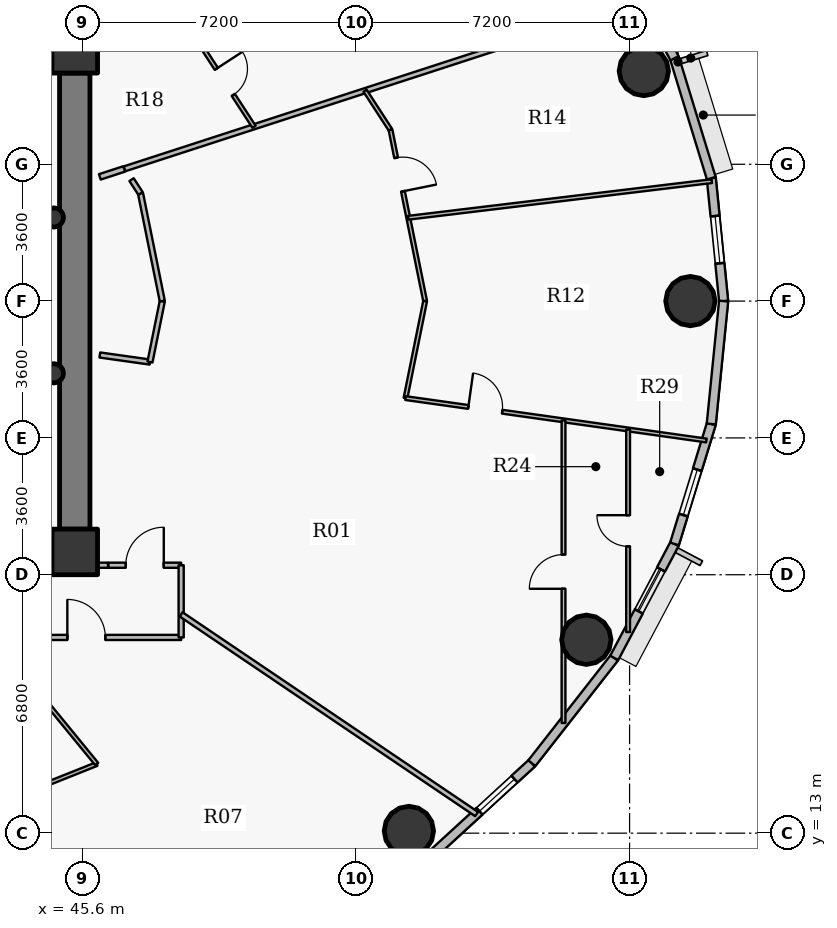
"""IFC4 building model, lengths in metres.
Left out: names, types, materials, properties, quantities, classifications, styles, units other than length and angle.
Written with IfcOpenShell. Run it as: python <this file> out.ifc"""

import sys

from ifc_helpers import new_model, si_unit, direction, frame, frame_2d, origin, origin_2d, place, context, subcontext, project, spatial, rectangle, hollow_circle, extrude, source, transform, mapped, element, fill, save


model = new_model("IFC4")
c1 = context("Model", 3, precision=1e-05, world=origin(), true_north=direction((0.0, 1.0)))
c2 = subcontext(c1, "Body", "Model", "MODEL_VIEW")
j1 = project(units=[si_unit("LENGTHUNIT", "METRE"), si_unit("PLANEANGLEUNIT", "RADIAN")], contexts=[c1])
p1 = place(None, origin())
s1 = spatial("IfcSite", under=j1, at=p1, CompositionType="ELEMENT")
p2 = place(p1, origin())
s2 = spatial("IfcBuilding", under=s1, at=p2, CompositionType="ELEMENT")
p3 = place(p2, frame((0.0, 0.0, 163.65)))
s3 = spatial("IfcBuildingStorey", under=s2, at=p3, CompositionType="ELEMENT", Elevation=163.65)
for number, where, z_axis, x_axis in (
    (1, (45.4, 20.4, 0.0), (0.0, 0.0, 1.0), (1.0, 0.0, 0.0)),
    (2, (45.4, 33.6, 0.0), (0.0, 0.0, 1.0), (1.0, 0.0, 0.0)),
):
    element("IfcColumn", number, at=place(p3, frame(where, z_axis=z_axis, x_axis=x_axis)), inside=s3, PredefinedType="COLUMN", context=c2, shape_type="SweptSolid", body=[
        extrude(rectangle(XDim=1.2, YDim=1.2, at=origin_2d()), origin(), (0.0, 0.0, 1.0), 3.75),
    ])
p4 = place(p3, frame((45.4, 33.0, 0.0), z_axis=(0.0, 0.0, 1.0), x_axis=(0.0, -1.0, 0.0)))
e3 = element("IfcWall", 3, at=p4, inside=s3, PredefinedType="SHEAR", context=c2, shape_type="SweptSolid", body=[
    extrude(rectangle(XDim=12.0, YDim=0.8, at=frame_2d((6.0, 0.0))), origin(), (0.0, 0.0, 1.0), 2.95),
])
for number, where, z_axis, x_axis in (
    (4, (61.6, 27.0, 0.0), (0.0, 0.0, 1.0), (1.0, 0.0, 0.0)),
    (5, (60.375, 33.053, 0.0), (0.0, 0.0, 1.0), (1.0, 0.0, 0.0)),
    (6, (54.192, 13.058, 0.0), (0.0, 0.0, 1.0), (1.0, 0.0, 0.0)),
    (7, (58.863, 18.089, 0.0), (0.0, 0.0, 1.0), (1.0, 0.0, 0.0)),
):
    element("IfcColumn", number, at=place(p3, frame(where, z_axis=z_axis, x_axis=x_axis)), inside=s3, PredefinedType="COLUMN", context=c2, shape_type="SweptSolid", body=[
        extrude(hollow_circle(Radius=0.65, WallThickness=0.04, at=origin_2d()), origin(), (0.0, 0.0, 1.0), 3.75),
    ])
for number, where, z_axis, x_axis in (
    (8, (44.85, 25.1, 0.0), (0.0, 0.0, 1.0), (1.0, 0.0, 0.0)),
    (9, (44.85, 29.2, 0.0), (0.0, 0.0, 1.0), (1.0, 0.0, 0.0)),
):
    element("IfcColumn", number, at=place(p3, frame(where, z_axis=z_axis, x_axis=x_axis)), inside=s3, PredefinedType="COLUMN", context=c2, shape_type="SweptSolid", body=[
        extrude(hollow_circle(Radius=0.254, WallThickness=0.02, at=origin_2d()), origin(), (0.0, 0.0, 1.0), 3.75),
    ])
p5 = place(p3, frame((62.15, 30.234, 0.0), z_axis=(0.0, 0.0, 1.0), x_axis=(0.100061534614, -0.994981250723, 0.0)))
e10 = element("IfcWall", 10, at=p5, inside=s3, PredefinedType="SOLIDWALL", context=c2, shape_type="SweptSolid", body=[
    extrude(rectangle(XDim=3.25, YDim=0.24, at=frame_2d((1.625, 0.0))), origin(), (0.0, 0.0, 1.0), 3.5),
])
p6 = place(p5, frame((1.0, 0.0, 0.9)))
e11 = element("IfcOpeningElement", 11, at=p6, cuts=e10, PredefinedType="OPENING", context=c2, shape_type="SweptSolid", body=[
    extrude(rectangle(XDim=1.25, YDim=1.65, at=origin_2d()), frame((0.625, 0.13, 0.825), z_axis=(0.0, -1.0, 0.0), x_axis=(1.0, 0.0, 0.0)), (0.0, 0.0, 1.0), 0.26),
])
p7 = place(p3, frame((61.183, 33.389, 0.0), z_axis=(0.0, 0.0, 1.0), x_axis=(0.293097995113, -0.956082405058, 0.0)))
e12 = element("IfcWall", 12, at=p7, inside=s3, PredefinedType="SOLIDWALL", context=c2, shape_type="SweptSolid", body=[
    extrude(rectangle(XDim=3.3, YDim=0.24, at=frame_2d((1.65, 0.0))), origin(), (0.0, 0.0, 1.0), 3.5),
])
p8 = place(p3, frame((59.596, 36.388, 0.0), z_axis=(0.0, 0.0, 1.0), x_axis=(0.467586874938, -0.88394712194, 0.0)))
e13 = element("IfcWall", 13, at=p8, inside=s3, PredefinedType="SOLIDWALL", context=c2, shape_type="SweptSolid", body=[
    extrude(rectangle(XDim=3.393, YDim=0.24, at=frame_2d((1.697, 0.0))), origin(), (0.0, 0.0, 1.0), 3.5),
])
p9 = place(p3, frame((57.428, 14.842, 0.0), z_axis=(0.0, 0.0, 1.0), x_axis=(-0.737076565834, -0.675809245349, 0.0)))
e14 = element("IfcWall", 14, at=p9, inside=s3, PredefinedType="SOLIDWALL", context=c2, shape_type="SweptSolid", body=[
    extrude(rectangle(XDim=3.658, YDim=0.24, at=frame_2d((1.829, 0.0))), origin(), (0.0, 0.0, 1.0), 3.5),
])
p10 = place(p9, frame((0.621, 0.0, 0.9)))
e15 = element("IfcOpeningElement", 15, at=p10, cuts=e14, PredefinedType="OPENING", context=c2, shape_type="SweptSolid", body=[
    extrude(rectangle(XDim=1.25, YDim=1.65, at=origin_2d()), frame((0.625, 0.13, 0.825), z_axis=(0.0, -1.0, 0.0), x_axis=(1.0, 0.0, 0.0)), (0.0, 0.0, 1.0), 0.26),
])
p11 = place(p3, frame((59.596, 17.612, 0.0), z_axis=(0.0, 0.0, 1.0), x_axis=(-0.616287674549, -0.787521112224, 0.0)))
e16 = element("IfcWall", 16, at=p11, inside=s3, PredefinedType="SOLIDWALL", context=c2, shape_type="SweptSolid", body=[
    extrude(rectangle(XDim=3.517, YDim=0.24, at=frame_2d((1.759, 0.0))), origin(), (0.0, 0.0, 1.0), 3.5),
])
p12 = place(p3, frame((61.183, 20.611, 0.0), z_axis=(0.0, 0.0, 1.0), x_axis=(-0.467586874938, -0.88394712194, 0.0)))
e17 = element("IfcWall", 17, at=p12, inside=s3, PredefinedType="SOLIDWALL", context=c2, shape_type="SweptSolid", body=[
    extrude(rectangle(XDim=3.393, YDim=0.24, at=frame_2d((1.697, 0.0))), origin(), (0.0, 0.0, 1.0), 3.5),
])
p13 = place(p12, frame((0.759, 0.0, 0.9)))
e18 = element("IfcOpeningElement", 18, at=p13, cuts=e17, PredefinedType="OPENING", context=c2, shape_type="SweptSolid", body=[
    extrude(rectangle(XDim=1.25, YDim=1.65, at=origin_2d()), frame((0.625, 0.13, 0.825), z_axis=(0.0, -1.0, 0.0), x_axis=(1.0, 0.0, 0.0)), (0.0, 0.0, 1.0), 0.26),
])
p14 = place(p3, frame((62.15, 23.766, 0.0), z_axis=(0.0, 0.0, 1.0), x_axis=(-0.293097995113, -0.956082405058, 0.0)))
e19 = element("IfcWall", 19, at=p14, inside=s3, PredefinedType="SOLIDWALL", context=c2, shape_type="SweptSolid", body=[
    extrude(rectangle(XDim=3.3, YDim=0.24, at=frame_2d((1.65, 0.0))), origin(), (0.0, 0.0, 1.0), 3.5),
])
p15 = place(p14, frame((1.256, 0.0, 0.9)))
e20 = element("IfcOpeningElement", 20, at=p15, cuts=e19, PredefinedType="OPENING", context=c2, shape_type="SweptSolid", body=[
    extrude(rectangle(XDim=1.25, YDim=1.65, at=origin_2d()), frame((0.625, 0.13, 0.825), z_axis=(0.0, -1.0, 0.0), x_axis=(1.0, 0.0, 0.0)), (0.0, 0.0, 1.0), 0.26),
])
p16 = place(p3, frame((62.475, 27.0, 0.0), z_axis=(0.0, 0.0, 1.0), x_axis=(-0.100061534614, -0.994981250723, 0.0)))
e21 = element("IfcWall", 21, at=p16, inside=s3, PredefinedType="SOLIDWALL", context=c2, shape_type="SweptSolid", body=[
    extrude(rectangle(XDim=3.25, YDim=0.24, at=frame_2d((1.625, 0.0))), origin(), (0.0, 0.0, 1.0), 3.5),
])
p17 = place(p3, frame((35.486, 18.15, 0.0), z_axis=(0.0, 0.0, 1.0), x_axis=(1.0, 0.0, 0.0)))
e22 = element("IfcWall", 22, at=p17, inside=s3, PredefinedType="PARTITIONING", context=c2, shape_type="SweptSolid", body=[
    extrude(rectangle(XDim=12.714, YDim=0.135, at=frame_2d((6.357, 0.0))), origin(), (0.0, 0.0, 1.0), 2.935),
])
p18 = place(p17, frame((1.628, 0.0, 0.0)))
e23 = element("IfcOpeningElement", 23, at=p18, cuts=e22, PredefinedType="OPENING", context=c2, shape_type="SweptSolid", body=[
    extrude(rectangle(XDim=1.0, YDim=2.15, at=origin_2d()), frame((0.5, 0.078, 1.075), z_axis=(0.0, -1.0, 0.0), x_axis=(1.0, 0.0, 0.0)), (0.0, 0.0, 1.0), 0.155),
])
p19 = place(p17, frame((9.719, 0.0, 0.0)))
e24 = element("IfcOpeningElement", 24, at=p19, cuts=e22, PredefinedType="OPENING", context=c2, shape_type="SweptSolid", body=[
    extrude(rectangle(XDim=1.0, YDim=2.15, at=origin_2d()), frame((0.5, 0.078, 1.075), z_axis=(0.0, -1.0, 0.0), x_axis=(1.0, 0.0, 0.0)), (0.0, 0.0, 1.0), 0.155),
])
p20 = place(p3, frame((41.794, 13.149, 0.0), z_axis=(0.0, 0.0, 1.0), x_axis=(0.928797683311, 0.370587187415, 0.0)))
e25 = element("IfcWall", 25, at=p20, inside=s3, PredefinedType="PARTITIONING", context=c2, shape_type="SweptSolid", body=[
    extrude(rectangle(XDim=4.506, YDim=0.1, at=frame_2d((2.253, 0.0))), origin(), (0.0, 0.0, 1.0), 2.935),
])
p21 = place(p20, frame((1.803, 0.0, 0.0)))
e26 = element("IfcOpeningElement", 26, at=p21, cuts=e25, PredefinedType="OPENING", context=c2, shape_type="SweptSolid", body=[
    extrude(rectangle(XDim=0.9, YDim=2.1, at=origin_2d()), frame((0.45, 0.06, 1.05), z_axis=(0.0, -1.0, 0.0), x_axis=(1.0, 0.0, 0.0)), (0.0, 0.0, 1.0), 0.12),
])
p22 = place(p3, frame((43.25, 18.15, 0.0), z_axis=(0.0, 0.0, 1.0), x_axis=(0.633743940899, -0.773542899505, 0.0)))
e27 = element("IfcWall", 27, at=p22, inside=s3, PredefinedType="PARTITIONING", context=c2, shape_type="SweptSolid", body=[
    extrude(rectangle(XDim=4.307, YDim=0.1, at=frame_2d((2.153, 0.0))), origin(), (0.0, 0.0, 1.0), 3.5),
])
p23 = place(p22, frame((0.414, 0.0, 0.0)))
e28 = element("IfcOpeningElement", 28, at=p23, cuts=e27, PredefinedType="OPENING", context=c2, shape_type="SweptSolid", body=[
    extrude(rectangle(XDim=0.82, YDim=2.1, at=origin_2d()), frame((0.41, 0.06, 1.05), z_axis=(0.0, -1.0, 0.0), x_axis=(1.0, 0.0, 0.0)), (0.0, 0.0, 1.0), 0.12),
])
p24 = place(p3, frame((46.285, 20.05, 0.0), z_axis=(0.0, 0.0, 1.0), x_axis=(1.0, 0.0, 0.0)))
e29 = element("IfcWall", 29, at=p24, inside=s3, PredefinedType="PARTITIONING", context=c2, shape_type="SweptSolid", body=[
    extrude(rectangle(XDim=1.915, YDim=0.135, at=frame_2d((0.958, 0.0))), origin(), (0.0, 0.0, 1.0), 3.5),
])
p25 = place(p24, frame((0.458, 0.0, 0.0)))
e30 = element("IfcOpeningElement", 30, at=p25, cuts=e29, PredefinedType="OPENING", context=c2, shape_type="SweptSolid", body=[
    extrude(rectangle(XDim=1.0, YDim=2.15, at=origin_2d()), frame((0.5, 0.078, 1.075), z_axis=(0.0, -1.0, 0.0), x_axis=(1.0, 0.0, 0.0)), (0.0, 0.0, 1.0), 0.155),
])
p26 = place(p3, frame((46.71, 30.48, 0.0), z_axis=(0.0, 0.0, 1.0), x_axis=(0.951054665008, 0.309022691992, 0.0)))
e31 = element("IfcWall", 31, at=p26, inside=s3, PredefinedType="PARTITIONING", context=c2, shape_type="SweptSolid", body=[
    extrude(rectangle(XDim=14.372, YDim=0.135, at=frame_2d((7.186, 0.0))), origin(), (0.0, 0.0, 1.0), 2.935),
])
p27 = place(p3, frame((48.2, 18.15, 0.0), z_axis=(0.0, 0.0, 1.0), x_axis=(0.0, 1.0, 0.0)))
e32 = element("IfcWall", 32, at=p27, inside=s3, PredefinedType="PARTITIONING", context=c2, shape_type="SweptSolid", body=[
    extrude(rectangle(XDim=1.9, YDim=0.135, at=frame_2d((0.95, 0.0))), origin(), (0.0, 0.0, 1.0), 3.5),
])
p28 = place(p3, frame((48.2, 18.756, 0.0), z_axis=(0.0, 0.0, 1.0), x_axis=(0.828559609568, -0.559900860325, 0.0)))
e33 = element("IfcWall", 33, at=p28, inside=s3, PredefinedType="PARTITIONING", context=c2, shape_type="SweptSolid", body=[
    extrude(rectangle(XDim=9.384, YDim=0.135, at=frame_2d((4.692, 0.0))), origin(), (0.0, 0.0, 1.0), 2.935),
])
p29 = place(p3, frame((48.58, 33.95, 0.0), z_axis=(0.0, 0.0, 1.0), x_axis=(0.545393120499, -0.838180376836, 0.0)))
e34 = element("IfcWall", 34, at=p29, inside=s3, PredefinedType="PARTITIONING", context=c2, shape_type="SweptSolid", body=[
    extrude(rectangle(XDim=2.819, YDim=0.1, at=frame_2d((1.41, 0.0))), origin(), (0.0, 0.0, 1.0), 3.5),
])
p30 = place(p29, frame((1.0, 0.0, 0.0)))
e35 = element("IfcOpeningElement", 35, at=p30, cuts=e34, PredefinedType="OPENING", context=c2, shape_type="SweptSolid", body=[
    extrude(rectangle(XDim=0.82, YDim=2.1, at=origin_2d()), frame((0.41, 0.06, 1.05), z_axis=(0.0, -1.0, 0.0), x_axis=(1.0, 0.0, 0.0)), (0.0, 0.0, 1.0), 0.12),
])
p31 = place(p3, frame((53.038, 32.536, 0.0), z_axis=(0.0, 0.0, 1.0), x_axis=(0.545407162254, -0.83817123988, 0.0)))
e36 = element("IfcWall", 36, at=p31, inside=s3, PredefinedType="PARTITIONING", context=c2, shape_type="SweptSolid", body=[
    extrude(rectangle(XDim=1.229, YDim=0.1, at=frame_2d((0.615, 0.0))), origin(), (0.0, 0.0, 1.0), 2.935),
])
p32 = place(p3, frame((53.709, 31.506, 0.0), z_axis=(0.0, 0.0, 1.0), x_axis=(0.198209478932, -0.980159682124, 0.0)))
e37 = element("IfcWall", 37, at=p32, inside=s3, PredefinedType="PARTITIONING", context=c2, shape_type="SweptSolid", body=[
    extrude(rectangle(XDim=4.597, YDim=0.1, at=frame_2d((2.298, 0.0))), origin(), (0.0, 0.0, 1.0), 2.935),
])
p33 = place(p32, frame((0.75, 0.0, 0.0)))
e38 = element("IfcOpeningElement", 38, at=p33, cuts=e37, PredefinedType="OPENING", context=c2, shape_type="SweptSolid", body=[
    extrude(rectangle(XDim=0.9, YDim=2.1, at=origin_2d()), frame((0.45, 0.06, 1.05), z_axis=(0.0, -1.0, 0.0), x_axis=(1.0, 0.0, 0.0)), (0.0, 0.0, 1.0), 0.12),
])
p34 = place(p3, frame((54.104, 24.448, 0.0), z_axis=(0.0, 0.0, 1.0), x_axis=(0.198315541218, 0.980138228063, 0.0)))
e39 = element("IfcWall", 39, at=p34, inside=s3, PredefinedType="PARTITIONING", context=c2, shape_type="SweptSolid", body=[
    extrude(rectangle(XDim=2.604, YDim=0.1, at=frame_2d((1.302, 0.0))), origin(), (0.0, 0.0, 1.0), 2.935),
])
p35 = place(p3, frame((54.104, 24.448, 0.0), z_axis=(0.0, 0.0, 1.0), x_axis=(0.990209750791, -0.139587425789, 0.0)))
e40 = element("IfcWall", 40, at=p35, inside=s3, PredefinedType="PARTITIONING", context=c2, shape_type="SweptSolid", body=[
    extrude(rectangle(XDim=7.997, YDim=0.1, at=frame_2d((3.998, 0.0))), origin(), (0.0, 0.0, 1.0), 2.935),
])
p36 = place(p35, frame((1.67, 0.0, 0.0)))
e41 = element("IfcOpeningElement", 41, at=p36, cuts=e40, PredefinedType="OPENING", context=c2, shape_type="SweptSolid", body=[
    extrude(rectangle(XDim=0.9, YDim=2.1, at=origin_2d()), frame((0.45, 0.06, 1.05), z_axis=(0.0, -1.0, 0.0), x_axis=(1.0, 0.0, 0.0)), (0.0, 0.0, 1.0), 0.12),
])
p37 = place(p3, frame((54.177, 29.193, 0.0), z_axis=(0.0, 0.0, 1.0), x_axis=(0.992799222866, 0.119790246168, 0.0)))
e42 = element("IfcWall", 42, at=p37, inside=s3, PredefinedType="PARTITIONING", context=c2, shape_type="SweptSolid", body=[
    extrude(rectangle(XDim=8.044, YDim=0.1, at=frame_2d((4.022, 0.0))), origin(), (0.0, 0.0, 1.0), 2.935),
])
p38 = place(p3, frame((58.262, 15.899, 0.0), z_axis=(0.0, 0.0, 1.0), x_axis=(0.0, 1.0, 0.0)))
e43 = element("IfcWall", 43, at=p38, inside=s3, PredefinedType="PARTITIONING", context=c2, shape_type="SweptSolid", body=[
    extrude(rectangle(XDim=7.963, YDim=0.1, at=frame_2d((3.981, 0.0))), origin(), (0.0, 0.0, 1.0), 2.935),
])
p39 = place(p38, frame((3.531, 0.0, 0.0)))
e44 = element("IfcOpeningElement", 44, at=p39, cuts=e43, PredefinedType="OPENING", context=c2, shape_type="SweptSolid", body=[
    extrude(rectangle(XDim=0.9, YDim=2.1, at=origin_2d()), frame((0.45, 0.06, 1.05), z_axis=(0.0, -1.0, 0.0), x_axis=(1.0, 0.0, 0.0)), (0.0, 0.0, 1.0), 0.12),
])
p40 = place(p3, frame((59.961, 18.291, 0.0), z_axis=(0.0, 0.0, 1.0), x_axis=(0.0, 1.0, 0.0)))
e45 = element("IfcWall", 45, at=p40, inside=s3, PredefinedType="PARTITIONING", context=c2, shape_type="SweptSolid", body=[
    extrude(rectangle(XDim=5.331, YDim=0.1, at=frame_2d((2.666, 0.0))), origin(), (0.0, 0.0, 1.0), 2.935),
])
p41 = place(p40, frame((2.256, 0.0, 0.0)))
e46 = element("IfcOpeningElement", 46, at=p41, cuts=e45, PredefinedType="OPENING", context=c2, shape_type="SweptSolid", body=[
    extrude(rectangle(XDim=0.82, YDim=2.1, at=origin_2d()), frame((0.41, 0.06, 1.05), z_axis=(0.0, -1.0, 0.0), x_axis=(1.0, 0.0, 0.0)), (0.0, 0.0, 1.0), 0.12),
])
p42 = place(p3, frame((44.81, 20.0, 0.0), z_axis=(0.0, 0.0, 1.0), x_axis=(1.0, 0.0, 0.0)))
e47 = element("IfcWall", 47, at=p42, inside=s3, PredefinedType="PARTITIONING", context=c2, shape_type="SweptSolid", body=[
    extrude(rectangle(XDim=0.99, YDim=0.135, at=frame_2d((0.495, 0.0))), origin(), (0.0, 0.0, 1.0), 2.935),
])
p43 = place(p3, frame((45.81, 20.05, 0.0), z_axis=(0.0, 0.0, 1.0), x_axis=(1.0, 0.0, 0.0)))
e48 = element("IfcWall", 48, at=p43, inside=s3, PredefinedType="PARTITIONING", context=c2, shape_type="SweptSolid", body=[
    extrude(rectangle(XDim=0.465, YDim=0.135, at=frame_2d((0.232, 0.0))), origin(), (0.0, 0.0, 1.0), 3.5),
])
p44 = place(p3, frame((45.8, 33.01, 0.0), z_axis=(0.0, 0.0, 1.0), x_axis=(0.0, 1.0, 0.0)))
e49 = element("IfcWall", 49, at=p44, inside=s3, PredefinedType="PARTITIONING", context=c2, shape_type="SweptSolid", body=[
    extrude(rectangle(XDim=0.682, YDim=0.15, at=frame_2d((0.341, 0.0))), origin(), (0.0, 0.0, 1.0), 3.5),
])
p45 = place(p3, frame((46.7, 30.477, 0.0), z_axis=(0.0, 0.0, 1.0), x_axis=(-0.951050060735, -0.309036861841, 0.0)))
e50 = element("IfcWall", 50, at=p45, inside=s3, PredefinedType="PARTITIONING", context=c2, shape_type="SweptSolid", body=[
    extrude(rectangle(XDim=0.673, YDim=0.15, at=frame_2d((0.336, 0.0))), origin(), (0.0, 0.0, 1.0), 3.5),
])
p46 = place(p3, frame((45.8, 20.378, 0.0), z_axis=(0.0, 0.0, 1.0), x_axis=(0.0, 1.0, 0.0)))
e51 = element("IfcWall", 51, at=p46, inside=s3, PredefinedType="PARTITIONING", context=c2, shape_type="SweptSolid", body=[
    extrude(rectangle(XDim=0.612, YDim=0.135, at=frame_2d((0.306, 0.0))), origin(), (0.0, 0.0, 1.0), 3.5),
])
p47 = place(p3, frame((46.06, 25.582, 0.0), z_axis=(0.0, 0.0, 1.0), x_axis=(0.990207965895, -0.139600086959, 0.0)))
e52 = element("IfcWall", 52, at=p47, inside=s3, PredefinedType="PARTITIONING", context=c2, shape_type="SweptSolid", body=[
    extrude(rectangle(XDim=1.333, YDim=0.135, at=frame_2d((0.666, 0.0))), origin(), (0.0, 0.0, 1.0), 3.5),
])
p48 = place(p3, frame((47.38, 25.396, 0.0), z_axis=(0.0, 0.0, 1.0), x_axis=(0.19826737525, 0.980147972457, 0.0)))
e53 = element("IfcWall", 53, at=p48, inside=s3, PredefinedType="PARTITIONING", context=c2, shape_type="SweptSolid", body=[
    extrude(rectangle(XDim=1.636, YDim=0.135, at=frame_2d((0.818, 0.0))), origin(), (0.0, 0.0, 1.0), 2.935),
])
p49 = place(p3, frame((47.704, 27.0, 0.0), z_axis=(0.0, 0.0, 1.0), x_axis=(-0.198292837027, 0.980142821625, 0.0)))
e54 = element("IfcWall", 54, at=p49, inside=s3, PredefinedType="PARTITIONING", context=c2, shape_type="SweptSolid", body=[
    extrude(rectangle(XDim=2.89, YDim=0.135, at=frame_2d((1.445, 0.0))), origin(), (0.0, 0.0, 1.0), 2.935),
])
p50 = place(p3, frame((47.131, 29.832, 0.0), z_axis=(0.0, 0.0, 1.0), x_axis=(-0.545305123916, 0.838237628499, 0.0)))
e55 = element("IfcWall", 55, at=p50, inside=s3, PredefinedType="PARTITIONING", context=c2, shape_type="SweptSolid", body=[
    extrude(rectangle(XDim=0.433, YDim=0.135, at=frame_2d((0.217, 0.0))), origin(), (0.0, 0.0, 1.0), 2.935),
])
m1 = source(origin(), c2, "Body", "SweptSolid", [
    extrude(rectangle(XDim=1.25, YDim=1.65, at=origin_2d()), frame((0.625, 0.03, 0.825), z_axis=(0.0, -1.0, 0.0), x_axis=(1.0, 0.0, 0.0)), (0.0, 0.0, 1.0), 0.06),
])
p51 = place(p13, origin())
e56 = element("IfcWindow", 56, at=p51, inside=s3, PartitioningType="SINGLE_PANEL", PredefinedType="WINDOW", context=c2, shape_type="MappedRepresentation", body=[
    mapped(m1, transform((0.0, 0.0, 0.0), x_axis=(1.0, 0.0, 0.0), y_axis=(0.0, 1.0, 0.0), z_axis=(0.0, 0.0, 1.0), scale=1.0)),
])
fill(e18, e56)
p52 = place(p15, origin())
e57 = element("IfcWindow", 57, at=p52, inside=s3, PartitioningType="SINGLE_PANEL", PredefinedType="WINDOW", context=c2, shape_type="MappedRepresentation", body=[
    mapped(m1, transform((0.0, 0.0, 0.0), x_axis=(1.0, 0.0, 0.0), y_axis=(0.0, 1.0, 0.0), z_axis=(0.0, 0.0, 1.0), scale=1.0)),
])
fill(e20, e57)
p53 = place(p10, origin())
e58 = element("IfcWindow", 58, at=p53, inside=s3, PartitioningType="SINGLE_PANEL", PredefinedType="WINDOW", context=c2, shape_type="MappedRepresentation", body=[
    mapped(m1, transform((0.0, 0.0, 0.0), x_axis=(1.0, 0.0, 0.0), y_axis=(0.0, 1.0, 0.0), z_axis=(0.0, 0.0, 1.0), scale=1.0)),
])
fill(e15, e58)
p54 = place(p6, origin())
e59 = element("IfcWindow", 59, at=p54, inside=s3, PartitioningType="SINGLE_PANEL", PredefinedType="WINDOW", context=c2, shape_type="MappedRepresentation", body=[
    mapped(m1, transform((0.0, 0.0, 0.0), x_axis=(1.0, 0.0, 0.0), y_axis=(0.0, 1.0, 0.0), z_axis=(0.0, 0.0, 1.0), scale=1.0)),
])
fill(e11, e59)
m2 = source(origin(), c2, "Body", "SweptSolid", [
    extrude(rectangle(XDim=0.82, YDim=2.1, at=origin_2d()), frame((0.41, 0.025, 1.05), z_axis=(0.0, -1.0, 0.0), x_axis=(1.0, 0.0, 0.0)), (0.0, 0.0, 1.0), 0.05),
])
p55 = place(p30, origin())
e60 = element("IfcDoor", 60, at=p55, inside=s3, OperationType="SINGLE_SWING_LEFT", PredefinedType="DOOR", context=c2, shape_type="MappedRepresentation", body=[
    mapped(m2, transform((0.0, 0.0, 0.0), x_axis=(1.0, 0.0, 0.0), y_axis=(0.0, 1.0, 0.0), z_axis=(0.0, 0.0, 1.0), scale=1.0)),
])
fill(e35, e60)
m3 = source(origin(), c2, "Body", "SweptSolid", [
    extrude(rectangle(XDim=1.0, YDim=2.15, at=origin_2d()), frame((0.5, 0.025, 1.075), z_axis=(0.0, -1.0, 0.0), x_axis=(1.0, 0.0, 0.0)), (0.0, 0.0, 1.0), 0.05),
])
p56 = place(p19, origin())
e61 = element("IfcDoor", 61, at=p56, inside=s3, OperationType="SINGLE_SWING_LEFT", PredefinedType="DOOR", context=c2, shape_type="MappedRepresentation", body=[
    mapped(m3, transform((0.0, 0.0, 0.0), x_axis=(1.0, 0.0, 0.0), y_axis=(0.0, 1.0, 0.0), z_axis=(0.0, 0.0, 1.0), scale=1.0)),
])
fill(e24, e61)
p57 = place(p25, origin())
e62 = element("IfcDoor", 62, at=p57, inside=s3, OperationType="SINGLE_SWING_RIGHT", PredefinedType="DOOR", context=c2, shape_type="MappedRepresentation", body=[
    mapped(m3, transform((0.0, 0.0, 0.0), x_axis=(1.0, 0.0, 0.0), y_axis=(0.0, 1.0, 0.0), z_axis=(0.0, 0.0, 1.0), scale=1.0)),
])
fill(e30, e62)
m4 = source(origin(), c2, "Body", "SweptSolid", [
    extrude(rectangle(XDim=0.9, YDim=2.1, at=origin_2d()), frame((0.45, 0.025, 1.05), z_axis=(0.0, -1.0, 0.0), x_axis=(1.0, 0.0, 0.0)), (0.0, 0.0, 1.0), 0.05),
])
p58 = place(p36, origin())
e63 = element("IfcDoor", 63, at=p58, inside=s3, OperationType="SINGLE_SWING_LEFT", PredefinedType="DOOR", context=c2, shape_type="MappedRepresentation", body=[
    mapped(m4, transform((0.0, 0.0, 0.0), x_axis=(1.0, 0.0, 0.0), y_axis=(0.0, 1.0, 0.0), z_axis=(0.0, 0.0, 1.0), scale=1.0)),
])
fill(e41, e63)
p59 = place(p33, origin())
e64 = element("IfcDoor", 64, at=p59, inside=s3, OperationType="SINGLE_SWING_RIGHT", PredefinedType="DOOR", context=c2, shape_type="MappedRepresentation", body=[
    mapped(m4, transform((0.0, 0.0, 0.0), x_axis=(1.0, 0.0, 0.0), y_axis=(0.0, 1.0, 0.0), z_axis=(0.0, 0.0, 1.0), scale=1.0)),
])
fill(e38, e64)
p60 = place(p39, origin())
e65 = element("IfcDoor", 65, at=p60, inside=s3, OperationType="SINGLE_SWING_LEFT", PredefinedType="DOOR", context=c2, shape_type="MappedRepresentation", body=[
    mapped(m4, transform((0.0, 0.0, 0.0), x_axis=(1.0, 0.0, 0.0), y_axis=(0.0, 1.0, 0.0), z_axis=(0.0, 0.0, 1.0), scale=1.0)),
])
fill(e44, e65)
p61 = place(p41, origin())
e66 = element("IfcDoor", 66, at=p61, inside=s3, OperationType="SINGLE_SWING_RIGHT", PredefinedType="DOOR", context=c2, shape_type="MappedRepresentation", body=[
    mapped(m2, transform((0.0, 0.0, 0.0), x_axis=(1.0, 0.0, 0.0), y_axis=(0.0, 1.0, 0.0), z_axis=(0.0, 0.0, 1.0), scale=1.0)),
])
fill(e46, e66)
save(model, sys.argv[1])
